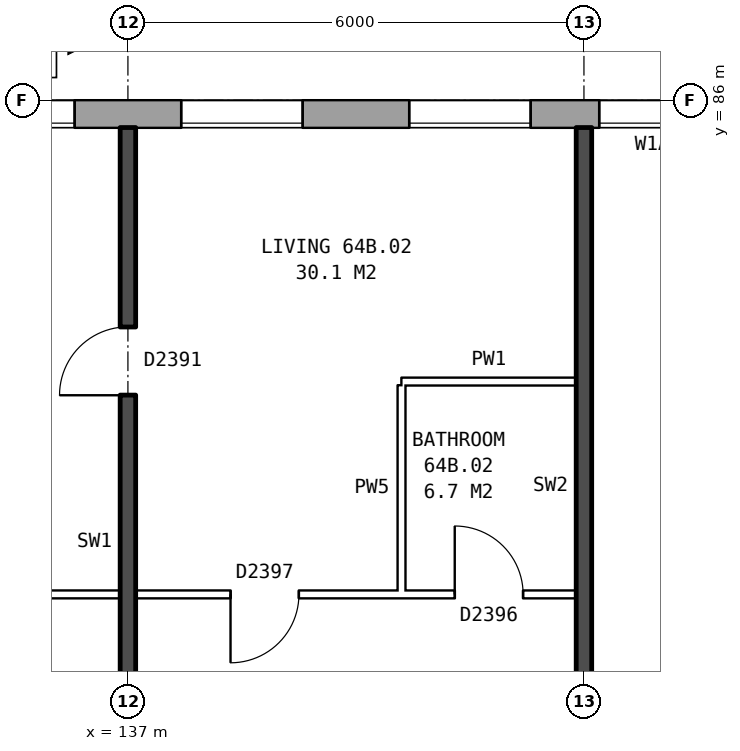
"""IFC4 building model, lengths in metres.
Left out: names, types, materials, properties, quantities, classifications, styles, units other than length and angle.
Written with IfcOpenShell. Run it as: python <this file> out.ifc"""

import sys

from ifc_helpers import new_model, si_unit, direction, frame, frame_2d, origin, place, context, subcontext, project, spatial, rectangle, extrude, element, fill, save


model = new_model("IFC4")
c1 = context("Model", 3, precision=1e-05, world=origin(), true_north=direction((0.0, 1.0)))
c2 = subcontext(c1, "Body", "Model", "MODEL_VIEW")
j1 = project(units=[si_unit("LENGTHUNIT", "METRE"), si_unit("PLANEANGLEUNIT", "RADIAN")], contexts=[c1])
p1 = place(None, origin())
s1 = spatial("IfcSite", under=j1, at=p1, CompositionType="ELEMENT")
p2 = place(p1, origin())
s2 = spatial("IfcBuilding", under=s1, at=p2, CompositionType="ELEMENT")
p3 = place(p2, frame((0.0, 0.0, 227.6)))
s3 = spatial("IfcBuildingStorey", under=s2, at=p3, CompositionType="ELEMENT", Elevation=227.6)
p4 = place(p3, frame((165.925, 85.82, 0.0), z_axis=(0.0, 0.0, 1.0), x_axis=(-1.0, 0.0, 0.0)))
e1 = element("IfcWall", 1, at=p4, inside=s3, PredefinedType="STANDARD", context=c2, shape_type="SweptSolid", body=[
    extrude(rectangle(XDim=33.875, YDim=0.36, at=frame_2d((16.938, 0.0))), origin(), (0.0, 0.0, 1.0), 2.85),
])
p5 = place(p4, frame((2.625, 0.0, 0.8)))
e2 = element("IfcOpeningElement", 2, at=p5, cuts=e1, PredefinedType="OPENING", context=c2, shape_type="SweptSolid", body=[
    extrude(rectangle(XDim=1.6, YDim=1.8, at=frame_2d((0.8, 0.9))), frame((0.0, 0.19, 0.0), z_axis=(0.0, -1.0, 0.0), x_axis=(1.0, 0.0, 0.0)), (0.0, 0.0, 1.0), 0.38),
])
p6 = place(p4, frame((5.625, 0.0, 0.8)))
e3 = element("IfcOpeningElement", 3, at=p6, cuts=e1, PredefinedType="OPENING", context=c2, shape_type="SweptSolid", body=[
    extrude(rectangle(XDim=1.6, YDim=1.8, at=frame_2d((0.8, 0.9))), frame((0.0, 0.19, 0.0), z_axis=(0.0, -1.0, 0.0), x_axis=(1.0, 0.0, 0.0)), (0.0, 0.0, 1.0), 0.38),
])
p7 = place(p4, frame((8.625, 0.0, 0.8)))
e4 = element("IfcOpeningElement", 4, at=p7, cuts=e1, PredefinedType="OPENING", context=c2, shape_type="SweptSolid", body=[
    extrude(rectangle(XDim=1.6, YDim=1.8, at=frame_2d((0.8, 0.9))), frame((0.0, 0.19, 0.0), z_axis=(0.0, -1.0, 0.0), x_axis=(1.0, 0.0, 0.0)), (0.0, 0.0, 1.0), 0.38),
])
p8 = place(p4, frame((12.675, 0.0, 0.15)))
e5 = element("IfcOpeningElement", 5, at=p8, cuts=e1, PredefinedType="OPENING", context=c2, shape_type="SweptSolid", body=[
    extrude(rectangle(XDim=1.0, YDim=1.8, at=frame_2d((0.5, 0.9))), frame((0.0, 0.19, 0.0), z_axis=(0.0, -1.0, 0.0), x_axis=(1.0, 0.0, 0.0)), (0.0, 0.0, 1.0), 0.38),
])
p9 = place(p4, frame((14.625, 0.0, 0.8)))
e6 = element("IfcOpeningElement", 6, at=p9, cuts=e1, PredefinedType="OPENING", context=c2, shape_type="SweptSolid", body=[
    extrude(rectangle(XDim=1.6, YDim=1.8, at=frame_2d((0.8, 0.9))), frame((0.0, 0.19, 0.0), z_axis=(0.0, -1.0, 0.0), x_axis=(1.0, 0.0, 0.0)), (0.0, 0.0, 1.0), 0.38),
])
p10 = place(p4, frame((17.125, 0.0, 0.8)))
e7 = element("IfcOpeningElement", 7, at=p10, cuts=e1, PredefinedType="OPENING", context=c2, shape_type="SweptSolid", body=[
    extrude(rectangle(XDim=1.6, YDim=1.8, at=frame_2d((0.8, 0.9))), frame((0.0, 0.19, 0.0), z_axis=(0.0, -1.0, 0.0), x_axis=(1.0, 0.0, 0.0)), (0.0, 0.0, 1.0), 0.38),
])
p11 = place(p4, frame((20.425, 0.0, 1.7)))
e8 = element("IfcOpeningElement", 8, at=p11, cuts=e1, PredefinedType="OPENING", context=c2, shape_type="SweptSolid", body=[
    extrude(rectangle(XDim=0.6, YDim=0.9, at=frame_2d((0.3, 0.45))), frame((0.0, 0.19, 0.0), z_axis=(0.0, -1.0, 0.0), x_axis=(1.0, 0.0, 0.0)), (0.0, 0.0, 1.0), 0.38),
])
p12 = place(p4, frame((23.625, 0.0, 0.8)))
e9 = element("IfcOpeningElement", 9, at=p12, cuts=e1, PredefinedType="OPENING", context=c2, shape_type="SweptSolid", body=[
    extrude(rectangle(XDim=1.6, YDim=1.8, at=frame_2d((0.8, 0.9))), frame((0.0, 0.19, 0.0), z_axis=(0.0, -1.0, 0.0), x_axis=(1.0, 0.0, 0.0)), (0.0, 0.0, 1.0), 0.38),
])
p13 = place(p4, frame((26.625, 0.0, 0.8)))
e10 = element("IfcOpeningElement", 10, at=p13, cuts=e1, PredefinedType="OPENING", context=c2, shape_type="SweptSolid", body=[
    extrude(rectangle(XDim=1.6, YDim=1.8, at=frame_2d((0.8, 0.9))), frame((0.0, 0.19, 0.0), z_axis=(0.0, -1.0, 0.0), x_axis=(1.0, 0.0, 0.0)), (0.0, 0.0, 1.0), 0.38),
])
p14 = place(p4, frame((29.625, 0.0, 0.8)))
e11 = element("IfcOpeningElement", 11, at=p14, cuts=e1, PredefinedType="OPENING", context=c2, shape_type="SweptSolid", body=[
    extrude(rectangle(XDim=1.6, YDim=1.8, at=frame_2d((0.8, 0.9))), frame((0.0, 0.19, 0.0), z_axis=(0.0, -1.0, 0.0), x_axis=(1.0, 0.0, 0.0)), (0.0, 0.0, 1.0), 0.38),
])
p15 = place(p4, frame((21.325, 0.0, 0.8)))
e12 = element("IfcOpeningElement", 12, at=p15, cuts=e1, PredefinedType="OPENING", context=c2, shape_type="SweptSolid", body=[
    extrude(rectangle(XDim=1.4, YDim=1.8, at=frame_2d((0.7, 0.9))), frame((0.0, 0.19, 0.0), z_axis=(0.0, -1.0, 0.0), x_axis=(1.0, 0.0, 0.0)), (0.0, 0.0, 1.0), 0.38),
])
p16 = place(p3, frame((131.1, 79.5, 0.0), z_axis=(0.0, 0.0, 1.0), x_axis=(1.0, 0.0, 0.0)))
e13 = element("IfcWall", 13, at=p16, inside=s3, PredefinedType="PARTITIONING", context=c2, shape_type="SweptSolid", body=[
    extrude(rectangle(XDim=11.8, YDim=0.1, at=frame_2d((5.9, 0.0))), origin(), (0.0, 0.0, 1.0), 2.85),
])
p17 = place(p16, frame((7.25, 0.0, 0.0)))
e14 = element("IfcOpeningElement", 14, at=p17, cuts=e13, PredefinedType="OPENING", context=c2, shape_type="SweptSolid", body=[
    extrude(rectangle(XDim=0.9, YDim=2.1, at=frame_2d((0.45, 1.05))), frame((0.0, 0.06, 0.0), z_axis=(0.0, -1.0, 0.0), x_axis=(1.0, 0.0, 0.0)), (0.0, 0.0, 1.0), 0.12),
])
p18 = place(p16, frame((10.2, 0.0, 0.0)))
e15 = element("IfcOpeningElement", 15, at=p18, cuts=e13, PredefinedType="OPENING", context=c2, shape_type="SweptSolid", body=[
    extrude(rectangle(XDim=0.9, YDim=2.1, at=frame_2d((0.45, 1.05))), frame((0.0, 0.06, 0.0), z_axis=(0.0, -1.0, 0.0), x_axis=(1.0, 0.0, 0.0)), (0.0, 0.0, 1.0), 0.12),
])
p19 = place(p3, frame((140.6, 82.3, 0.0), z_axis=(0.0, 0.0, 1.0), x_axis=(1.0, 0.0, 0.0)))
e16 = element("IfcWall", 16, at=p19, inside=s3, PredefinedType="PARTITIONING", context=c2, shape_type="SweptSolid", body=[
    extrude(rectangle(XDim=2.3, YDim=0.1, at=frame_2d((1.15, 0.0))), origin(), (0.0, 0.0, 1.0), 2.85),
])
p20 = place(p3, frame((137.0, 76.2, 0.0), z_axis=(0.0, 0.0, 1.0), x_axis=(0.0, 1.0, 0.0)))
e17 = element("IfcWall", 17, at=p20, inside=s3, PredefinedType="SOLIDWALL", context=c2, shape_type="SweptSolid", body=[
    extrude(rectangle(XDim=9.44, YDim=0.2, at=frame_2d((4.72, 0.0))), origin(), (0.0, 0.0, 1.0), 2.85),
])
p21 = place(p20, frame((5.92, 0.0, 0.0)))
e18 = element("IfcOpeningElement", 18, at=p21, cuts=e17, PredefinedType="OPENING", context=c2, shape_type="SweptSolid", body=[
    extrude(rectangle(XDim=0.9, YDim=2.1, at=frame_2d((0.45, 1.05))), frame((0.0, 0.11, 0.0), z_axis=(0.0, -1.0, 0.0), x_axis=(1.0, 0.0, 0.0)), (0.0, 0.0, 1.0), 0.22),
])
p22 = place(p20, frame((1.25, 0.0, 0.0)))
e19 = element("IfcOpeningElement", 19, at=p22, cuts=e17, PredefinedType="OPENING", context=c2, shape_type="SweptSolid", body=[
    extrude(rectangle(XDim=0.8, YDim=2.1, at=frame_2d((0.4, 1.05))), frame((0.0, 0.11, 0.0), z_axis=(0.0, -1.0, 0.0), x_axis=(1.0, 0.0, 0.0)), (0.0, 0.0, 1.0), 0.22),
])
p23 = place(p3, frame((140.6, 79.55, 0.0), z_axis=(0.0, 0.0, 1.0), x_axis=(0.0, 1.0, 0.0)))
e20 = element("IfcWall", 20, at=p23, inside=s3, PredefinedType="PARTITIONING", context=c2, shape_type="SweptSolid", body=[
    extrude(rectangle(XDim=2.7, YDim=0.1, at=frame_2d((1.35, 0.0))), origin(), (0.0, 0.0, 1.0), 2.85),
])
p24 = place(p3, frame((143.0, 76.2, 0.0), z_axis=(0.0, 0.0, 1.0), x_axis=(0.0, 1.0, 0.0)))
e21 = element("IfcWall", 21, at=p24, inside=s3, PredefinedType="SOLIDWALL", context=c2, shape_type="SweptSolid", body=[
    extrude(rectangle(XDim=9.44, YDim=0.2, at=frame_2d((4.72, 0.0))), origin(), (0.0, 0.0, 1.0), 2.85),
])
p25 = place(p12, origin())
e22 = element("IfcWindow", 22, at=p25, inside=s3, PartitioningType="SINGLE_PANEL", PredefinedType="WINDOW", context=c2, shape_type="SweptSolid", body=[
    extrude(rectangle(XDim=1.6, YDim=1.8, at=frame_2d((0.8, 0.9))), frame((0.0, 0.15, 0.0), z_axis=(0.0, -1.0, 0.0), x_axis=(1.0, 0.0, 0.0)), (0.0, 0.0, 1.0), 0.06),
])
fill(e9, e22)
p26 = place(p13, origin())
e23 = element("IfcWindow", 23, at=p26, inside=s3, PartitioningType="SINGLE_PANEL", PredefinedType="WINDOW", context=c2, shape_type="SweptSolid", body=[
    extrude(rectangle(XDim=1.6, YDim=1.8, at=frame_2d((0.8, 0.9))), frame((0.0, 0.15, 0.0), z_axis=(0.0, -1.0, 0.0), x_axis=(1.0, 0.0, 0.0)), (0.0, 0.0, 1.0), 0.06),
])
fill(e10, e23)
p27 = place(p14, origin())
e24 = element("IfcWindow", 24, at=p27, inside=s3, PartitioningType="SINGLE_PANEL", PredefinedType="WINDOW", context=c2, shape_type="SweptSolid", body=[
    extrude(rectangle(XDim=1.6, YDim=1.8, at=frame_2d((0.8, 0.9))), frame((0.0, 0.15, 0.0), z_axis=(0.0, -1.0, 0.0), x_axis=(1.0, 0.0, 0.0)), (0.0, 0.0, 1.0), 0.06),
])
fill(e11, e24)
p28 = place(p21, origin())
e25 = element("IfcDoor", 25, at=p28, inside=s3, OperationType="SINGLE_SWING_LEFT", PredefinedType="DOOR", context=c2, shape_type="SweptSolid", body=[
    extrude(rectangle(XDim=0.9, YDim=2.1, at=frame_2d((0.45, 1.05))), frame((0.0, 0.025, 0.0), z_axis=(0.0, -1.0, 0.0), x_axis=(1.0, 0.0, 0.0)), (0.0, 0.0, 1.0), 0.05),
])
fill(e18, e25)
p29 = place(p17, frame((0.9, 0.0, 0.0), z_axis=(0.0, 0.0, 1.0), x_axis=(-1.0, 0.0, 0.0)))
e26 = element("IfcDoor", 26, at=p29, inside=s3, OperationType="SINGLE_SWING_RIGHT", PredefinedType="DOOR", context=c2, shape_type="SweptSolid", body=[
    extrude(rectangle(XDim=0.9, YDim=2.1, at=frame_2d((0.45, 1.05))), frame((0.0, 0.025, 0.0), z_axis=(0.0, -1.0, 0.0), x_axis=(1.0, 0.0, 0.0)), (0.0, 0.0, 1.0), 0.05),
])
fill(e14, e26)
p30 = place(p18, origin())
e27 = element("IfcDoor", 27, at=p30, inside=s3, OperationType="SINGLE_SWING_LEFT", PredefinedType="DOOR", context=c2, shape_type="SweptSolid", body=[
    extrude(rectangle(XDim=0.9, YDim=2.1, at=frame_2d((0.45, 1.05))), frame((0.0, 0.025, 0.0), z_axis=(0.0, -1.0, 0.0), x_axis=(1.0, 0.0, 0.0)), (0.0, 0.0, 1.0), 0.05),
])
fill(e15, e27)
p31 = place(p15, origin())
e28 = element("IfcWindow", 28, at=p31, inside=s3, PartitioningType="SINGLE_PANEL", PredefinedType="WINDOW", context=c2, shape_type="SweptSolid", body=[
    extrude(rectangle(XDim=1.4, YDim=1.8, at=frame_2d((0.7, 0.9))), frame((0.0, 0.15, 0.0), z_axis=(0.0, -1.0, 0.0), x_axis=(1.0, 0.0, 0.0)), (0.0, 0.0, 1.0), 0.06),
])
fill(e12, e28)
save(model, sys.argv[1])
